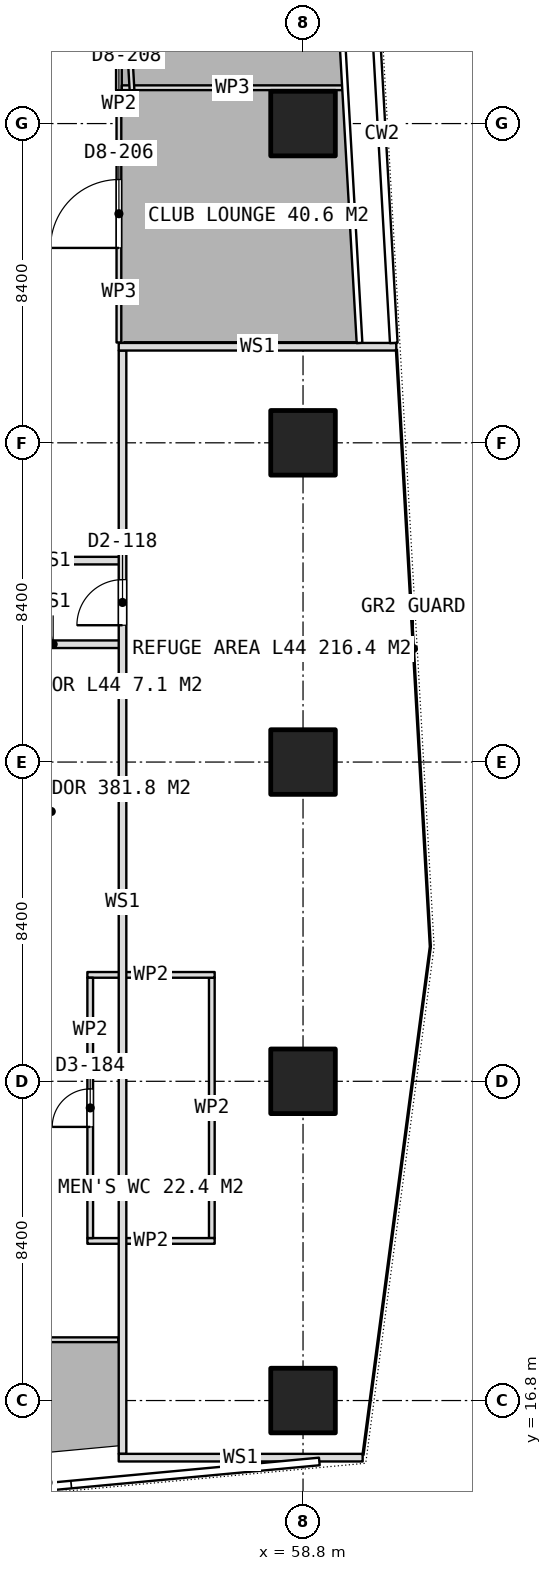
"""IFC4 building model, lengths in metres.
Left out: names, types, materials, properties, quantities, classifications, styles, units other than length and angle.
Written with IfcOpenShell. Run it as: python <this file> out.ifc"""

import sys

from ifc_helpers import new_model, si_unit, direction, frame, frame_2d, origin, origin_2d, place, context, subcontext, project, spatial, rectangle, extrude, element, fill, save


model = new_model("IFC4")
c1 = context("Model", 3, precision=1e-05, world=origin(), true_north=direction((0.0, 1.0)))
c2 = subcontext(c1, "Body", "Model", "MODEL_VIEW")
j1 = project(units=[si_unit("LENGTHUNIT", "METRE"), si_unit("PLANEANGLEUNIT", "RADIAN")], contexts=[c1])
p1 = place(None, origin())
s1 = spatial("IfcSite", under=j1, at=p1, CompositionType="ELEMENT")
p2 = place(p1, origin())
s2 = spatial("IfcBuilding", under=s1, at=p2, CompositionType="ELEMENT")
p3 = place(p2, frame((0.0, 0.0, 176.45)))
s3 = spatial("IfcBuildingStorey", under=s2, at=p3, CompositionType="ELEMENT", Elevation=176.45)
for number, where, z_axis, x_axis in (
    (1, (58.8, 16.8, 0.0), (0.0, 0.0, 1.0), (1.0, 0.0, 0.0)),
    (2, (58.8, 25.2, 0.0), (0.0, 0.0, 1.0), (1.0, 0.0, 0.0)),
    (3, (58.8, 33.6, 0.0), (0.0, 0.0, 1.0), (1.0, 0.0, 0.0)),
    (4, (58.8, 42.0, 0.0), (0.0, 0.0, 1.0), (1.0, 0.0, 0.0)),
    (5, (58.8, 50.4, 0.0), (0.0, 0.0, 1.0), (1.0, 0.0, 0.0)),
):
    element("IfcColumn", number, at=place(p3, frame(where, z_axis=z_axis, x_axis=x_axis)), inside=s3, PredefinedType="COLUMN", context=c2, shape_type="SweptSolid", body=[
        extrude(rectangle(XDim=1.7, YDim=1.7, at=origin_2d()), origin(), (0.0, 0.0, 1.0), 3.75),
    ])
for number, where, z_axis, x_axis in (
    (6, (53.125, 21.0, 0.0), (0.0, 0.0, 1.0), (1.0, 0.0, 0.0)),
    (7, (53.125, 28.0, 0.0), (0.0, 0.0, 1.0), (1.0, 0.0, 0.0)),
):
    element("IfcWall", number, at=place(p3, frame(where, z_axis=z_axis, x_axis=x_axis)), inside=s3, PredefinedType="PARTITIONING", context=c2, shape_type="SweptSolid", body=[
        extrude(rectangle(XDim=3.35, YDim=0.15, at=frame_2d((1.675, 0.0))), origin(), (0.0, 0.0, 1.0), 3.5),
    ])
p4 = place(p3, frame((53.2, 21.075, 0.0), z_axis=(0.0, 0.0, 1.0), x_axis=(0.0, 1.0, 0.0)))
e8 = element("IfcWall", 8, at=p4, inside=s3, PredefinedType="PARTITIONING", context=c2, shape_type="SweptSolid", body=[
    extrude(rectangle(XDim=6.85, YDim=0.15, at=frame_2d((3.425, 0.0))), origin(), (0.0, 0.0, 1.0), 3.5),
])
p5 = place(p4, frame((2.925, 0.0, 0.0)))
e9 = element("IfcOpeningElement", 9, at=p5, cuts=e8, PredefinedType="OPENING", context=c2, shape_type="SweptSolid", body=[
    extrude(rectangle(XDim=1.0, YDim=2.1, at=frame_2d((0.5, 1.05))), frame((0.0, 0.085, 0.0), z_axis=(0.0, -1.0, 0.0), x_axis=(1.0, 0.0, 0.0)), (0.0, 0.0, 1.0), 0.17),
])
p6 = place(p3, frame((56.4, 21.075, 0.0), z_axis=(0.0, 0.0, 1.0), x_axis=(0.0, 1.0, 0.0)))
e10 = element("IfcWall", 10, at=p6, inside=s3, PredefinedType="PARTITIONING", context=c2, shape_type="SweptSolid", body=[
    extrude(rectangle(XDim=6.85, YDim=0.15, at=frame_2d((3.425, 0.0))), origin(), (0.0, 0.0, 1.0), 3.5),
])
p7 = place(p3, frame((53.955, 44.639, 0.0), z_axis=(0.0, 0.0, 1.0), x_axis=(0.0, 1.0, 0.0)))
e11 = element("IfcWall", 11, at=p7, inside=s3, PredefinedType="PARTITIONING", context=c2, shape_type="SweptSolid", body=[
    extrude(rectangle(XDim=6.637, YDim=0.125, at=frame_2d((3.318, 0.0))), origin(), (0.0, 0.0, 1.0), 3.5),
])
p8 = place(p7, frame((2.489, 0.0, 0.0)))
e12 = element("IfcOpeningElement", 12, at=p8, cuts=e11, PredefinedType="OPENING", context=c2, shape_type="SweptSolid", body=[
    extrude(rectangle(XDim=1.8, YDim=2.1, at=frame_2d((0.9, 1.05))), frame((0.0, 0.073, 0.0), z_axis=(0.0, -1.0, 0.0), x_axis=(1.0, 0.0, 0.0)), (0.0, 0.0, 1.0), 0.145),
])
p9 = place(p3, frame((54.03, 51.343, 0.0), z_axis=(0.0, 0.0, 1.0), x_axis=(1.0, 0.0, 0.0)))
e13 = element("IfcWall", 13, at=p9, inside=s3, PredefinedType="PARTITIONING", context=c2, shape_type="SweptSolid", body=[
    extrude(rectangle(XDim=5.825, YDim=0.125, at=frame_2d((2.913, 0.0))), origin(), (0.0, 0.0, 1.0), 3.5),
])
p10 = place(p3, frame((54.3, 51.277, 0.0), z_axis=(0.0, 0.0, 1.0), x_axis=(-0.056501273679, 0.998402527076, 0.0)))
e14 = element("IfcWall", 14, at=p10, inside=s3, PredefinedType="PARTITIONING", context=c2, shape_type="SweptSolid", body=[
    extrude(rectangle(XDim=4.196, YDim=0.125, at=frame_2d((2.098, 0.0))), origin(), (0.0, 0.0, 1.0), 3.5),
])
p11 = place(p10, frame((1.598, 0.0, 0.0)))
e15 = element("IfcOpeningElement", 15, at=p11, cuts=e14, PredefinedType="OPENING", context=c2, shape_type="SweptSolid", body=[
    extrude(rectangle(XDim=1.8, YDim=2.1, at=frame_2d((0.9, 1.05))), frame((0.0, 0.073, 0.0), z_axis=(0.0, -1.0, 0.0), x_axis=(1.0, 0.0, 0.0)), (0.0, 0.0, 1.0), 0.145),
])
p12 = place(p3, frame((53.955, 51.276, 0.0), z_axis=(0.0, 0.0, 1.0), x_axis=(0.0, 1.0, 0.0)))
e16 = element("IfcWall", 16, at=p12, inside=s3, PredefinedType="PARTITIONING", context=c2, shape_type="SweptSolid", body=[
    extrude(rectangle(XDim=1.474, YDim=0.15, at=frame_2d((0.737, 0.0))), origin(), (0.0, 0.0, 1.0), 3.5),
])
p13 = place(p3, frame((44.345, 18.4, 0.0), z_axis=(0.0, 0.0, 1.0), x_axis=(1.0, 0.0, 0.0)))
e17 = element("IfcWall", 17, at=p13, inside=s3, PredefinedType="PARTITIONING", context=c2, shape_type="SweptSolid", body=[
    extrude(rectangle(XDim=9.594, YDim=0.125, at=frame_2d((4.797, 0.0))), origin(), (0.0, 0.0, 1.0), 3.5),
])
p14 = place(p13, frame((4.127, 0.0, 0.0)))
e18 = element("IfcOpeningElement", 18, at=p14, cuts=e17, PredefinedType="OPENING", context=c2, shape_type="SweptSolid", body=[
    extrude(rectangle(XDim=1.0, YDim=2.1, at=frame_2d((0.5, 1.05))), frame((0.0, 0.073, 0.0), z_axis=(0.0, -1.0, 0.0), x_axis=(1.0, 0.0, 0.0)), (0.0, 0.0, 1.0), 0.145),
])
p15 = place(p3, frame((54.05, 15.397, 0.0), z_axis=(0.0, 0.0, 1.0), x_axis=(0.0, 1.0, 0.0)))
e19 = element("IfcWall", 19, at=p15, inside=s3, PredefinedType="PARTITIONING", context=c2, shape_type="SweptSolid", body=[
    extrude(rectangle(XDim=29.031, YDim=0.2, at=frame_2d((14.516, 0.0))), origin(), (0.0, 0.0, 1.0), 3.5),
])
p16 = place(p15, frame((21.803, 0.0, 0.0)))
e20 = element("IfcOpeningElement", 20, at=p16, cuts=e19, PredefinedType="OPENING", context=c2, shape_type="SweptSolid", body=[
    extrude(rectangle(XDim=1.2, YDim=2.1, at=frame_2d((0.6, 1.05))), frame((0.0, 0.11, 0.0), z_axis=(0.0, -1.0, 0.0), x_axis=(1.0, 0.0, 0.0)), (0.0, 0.0, 1.0), 0.22),
])
p17 = place(p3, frame((53.95, 15.297, 0.0), z_axis=(0.0, 0.0, 1.0), x_axis=(1.0, 0.0, 0.0)))
e21 = element("IfcWall", 21, at=p17, inside=s3, PredefinedType="PARTITIONING", context=c2, shape_type="SweptSolid", body=[
    extrude(rectangle(XDim=6.419, YDim=0.2, at=frame_2d((3.209, 0.0))), origin(), (0.0, 0.0, 1.0), 3.5),
])
p18 = place(p3, frame((53.95, 44.528, 0.0), z_axis=(0.0, 0.0, 1.0), x_axis=(1.0, 0.0, 0.0)))
e22 = element("IfcWall", 22, at=p18, inside=s3, PredefinedType="PARTITIONING", context=c2, shape_type="SweptSolid", body=[
    extrude(rectangle(XDim=7.304, YDim=0.2, at=frame_2d((3.652, 0.0))), origin(), (0.0, 0.0, 1.0), 3.5),
])
p19 = place(p3, frame((50.4, 38.9, 0.0), z_axis=(0.0, 0.0, 1.0), x_axis=(1.0, 0.0, 0.0)))
e23 = element("IfcWall", 23, at=p19, inside=s3, PredefinedType="PARTITIONING", context=c2, shape_type="SweptSolid", body=[
    extrude(rectangle(XDim=3.65, YDim=0.2, at=frame_2d((1.825, 0.0))), origin(), (0.0, 0.0, 1.0), 3.5),
])
p20 = place(p3, frame((50.4, 36.7, 0.0), z_axis=(0.0, 0.0, 1.0), x_axis=(1.0, 0.0, 0.0)))
e24 = element("IfcWall", 24, at=p20, inside=s3, PredefinedType="PARTITIONING", context=c2, shape_type="SweptSolid", body=[
    extrude(rectangle(XDim=3.65, YDim=0.2, at=frame_2d((1.825, 0.0))), origin(), (0.0, 0.0, 1.0), 3.5),
])
p21 = place(p20, frame((0.6, 0.0, 0.0)))
e25 = element("IfcOpeningElement", 25, at=p21, cuts=e24, PredefinedType="OPENING", context=c2, shape_type="SweptSolid", body=[
    extrude(rectangle(XDim=1.2, YDim=2.1, at=frame_2d((0.6, 1.05))), frame((0.0, 0.11, 0.0), z_axis=(0.0, -1.0, 0.0), x_axis=(1.0, 0.0, 0.0)), (0.0, 0.0, 1.0), 0.22),
])
p22 = place(p5, origin())
e26 = element("IfcDoor", 26, at=p22, inside=s3, OperationType="SINGLE_SWING_LEFT", PredefinedType="DOOR", context=c2, shape_type="SweptSolid", body=[
    extrude(rectangle(XDim=1.0, YDim=2.1, at=frame_2d((0.5, 1.05))), frame((0.0, 0.025, 0.0), z_axis=(0.0, -1.0, 0.0), x_axis=(1.0, 0.0, 0.0)), (0.0, 0.0, 1.0), 0.05),
])
fill(e9, e26)
p23 = place(p8, origin())
e27 = element("IfcDoor", 27, at=p23, inside=s3, OperationType="DOUBLE_DOOR_SINGLE_SWING", PredefinedType="DOOR", context=c2, shape_type="SweptSolid", body=[
    extrude(rectangle(XDim=1.8, YDim=2.1, at=frame_2d((0.9, 1.05))), frame((0.0, 0.025, 0.0), z_axis=(0.0, -1.0, 0.0), x_axis=(1.0, 0.0, 0.0)), (0.0, 0.0, 1.0), 0.05),
])
fill(e12, e27)
p24 = place(p16, origin())
e28 = element("IfcDoor", 28, at=p24, inside=s3, OperationType="SINGLE_SWING_LEFT", PredefinedType="DOOR", context=c2, shape_type="SweptSolid", body=[
    extrude(rectangle(XDim=1.2, YDim=2.1, at=frame_2d((0.6, 1.05))), frame((0.0, 0.025, 0.0), z_axis=(0.0, -1.0, 0.0), x_axis=(1.0, 0.0, 0.0)), (0.0, 0.0, 1.0), 0.05),
])
fill(e20, e28)
p25 = place(p21, origin())
e29 = element("IfcDoor", 29, at=p25, inside=s3, OperationType="SINGLE_SWING_LEFT", PredefinedType="DOOR", context=c2, shape_type="SweptSolid", body=[
    extrude(rectangle(XDim=1.2, YDim=2.1, at=frame_2d((0.6, 1.05))), frame((0.0, 0.025, 0.0), z_axis=(0.0, -1.0, 0.0), x_axis=(1.0, 0.0, 0.0)), (0.0, 0.0, 1.0), 0.05),
])
fill(e25, e29)
save(model, sys.argv[1])
